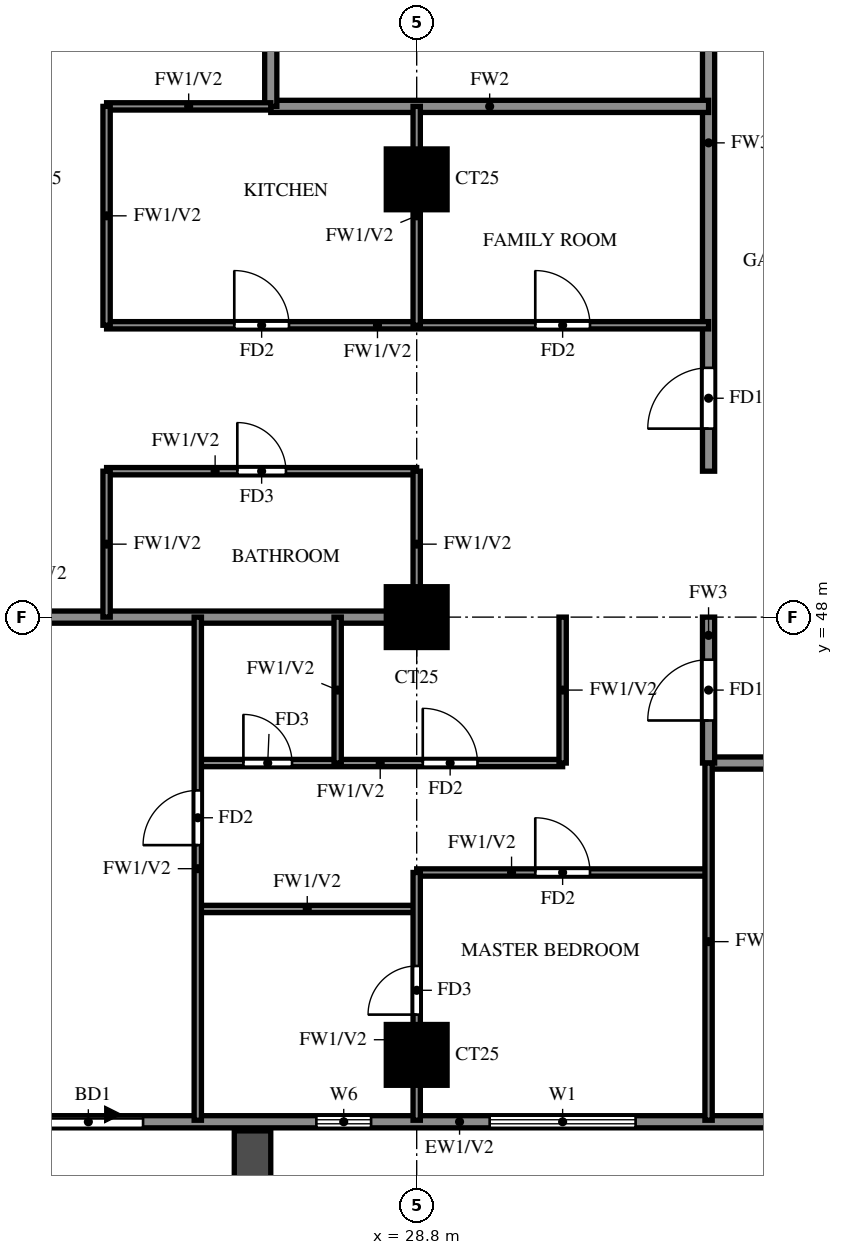
"""IFC4 building model, lengths in metres.
Left out: names, types, materials, properties, quantities, classifications, styles, units other than length and angle.
Written with IfcOpenShell. Run it as: python <this file> out.ifc"""

import sys

from ifc_helpers import new_model, si_unit, direction, frame, frame_2d, origin, origin_2d, place, context, subcontext, project, spatial, rectangle, extrude, source, transform, mapped, element, fill, save


model = new_model("IFC4")
c1 = context("Model", 3, precision=1e-05, world=origin(), true_north=direction((0.0, 1.0)))
c2 = subcontext(c1, "Body", "Model", "MODEL_VIEW")
j1 = project(units=[si_unit("LENGTHUNIT", "METRE"), si_unit("PLANEANGLEUNIT", "RADIAN")], contexts=[c1])
p1 = place(None, origin())
s1 = spatial("IfcSite", under=j1, at=p1, CompositionType="ELEMENT")
p2 = place(p1, origin())
s2 = spatial("IfcBuilding", under=s1, at=p2, CompositionType="ELEMENT")
p3 = place(p2, frame((0.0, 0.0, 157.0)))
s3 = spatial("IfcBuildingStorey", under=s2, at=p3, CompositionType="ELEMENT", Elevation=157.0)
m1 = source(origin(), c2, "Body", "SweptSolid", [
    extrude(rectangle(XDim=1.0, YDim=1.0, at=origin_2d()), origin(), (0.0, 0.0, 1.0), 3.2),
])
for number, where, z_axis, x_axis in (
    (1, (28.8, 40.8, 0.0), (0.0, 0.0, 1.0), (1.0, 0.0, 0.0)),
    (2, (28.8, 48.0, 0.0), (0.0, 0.0, 1.0), (1.0, 0.0, 0.0)),
    (3, (28.8, 55.2, 0.0), (0.0, 0.0, 1.0), (1.0, 0.0, 0.0)),
):
    element("IfcColumn", number, at=place(p3, frame(where, z_axis=z_axis, x_axis=x_axis)), inside=s3, PredefinedType="COLUMN", context=c2, shape_type="MappedRepresentation", body=[
        mapped(m1, transform((0.0, 0.0, 0.0))),
    ])
p4 = place(p3, frame((18.2, 39.7, 0.0), z_axis=(0.0, 0.0, 1.0), x_axis=(1.0, 0.0, 0.0)))
e4 = element("IfcWall", 4, at=p4, inside=s3, PredefinedType="SOLIDWALL", context=c2, shape_type="SweptSolid", body=[
    extrude(rectangle(XDim=23.8, YDim=0.2, at=frame_2d((11.9, 0.0))), origin(), (0.0, 0.0, 1.0), 3.2),
])
p5 = place(p4, frame((4.3, 0.0, 0.0)))
e5 = element("IfcOpeningElement", 5, at=p5, cuts=e4, PredefinedType="OPENING", context=c2, shape_type="SweptSolid", body=[
    extrude(rectangle(XDim=1.8, YDim=2.4, at=frame_2d((0.9, 1.2))), frame((0.0, 0.11, 0.0), z_axis=(0.0, -1.0, 0.0), x_axis=(1.0, 0.0, 0.0)), (0.0, 0.0, 1.0), 0.22),
])
p6 = place(p4, frame((1.9, 0.0, 0.6)))
e6 = element("IfcOpeningElement", 6, at=p6, cuts=e4, PredefinedType="OPENING", context=c2, shape_type="SweptSolid", body=[
    extrude(rectangle(XDim=1.8, YDim=2.4, at=frame_2d((0.9, 1.2))), frame((0.0, 0.11, 0.0), z_axis=(0.0, -1.0, 0.0), x_axis=(1.0, 0.0, 0.0)), (0.0, 0.0, 1.0), 0.22),
])
p7 = place(p4, frame((11.8, 0.0, 0.6)))
e7 = element("IfcOpeningElement", 7, at=p7, cuts=e4, PredefinedType="OPENING", context=c2, shape_type="SweptSolid", body=[
    extrude(rectangle(XDim=2.4, YDim=2.4, at=frame_2d((1.2, 1.2))), frame((0.0, 0.11, 0.0), z_axis=(0.0, -1.0, 0.0), x_axis=(1.0, 0.0, 0.0)), (0.0, 0.0, 1.0), 0.22),
])
p8 = place(p4, frame((8.95, 0.0, 1.5)))
e8 = element("IfcOpeningElement", 8, at=p8, cuts=e4, PredefinedType="OPENING", context=c2, shape_type="SweptSolid", body=[
    extrude(rectangle(XDim=0.9, YDim=0.9, at=frame_2d((0.45, 0.45))), frame((0.0, 0.11, 0.0), z_axis=(0.0, -1.0, 0.0), x_axis=(1.0, 0.0, 0.0)), (0.0, 0.0, 1.0), 0.22),
])
p9 = place(p3, frame((26.1, 39.55, 0.0), z_axis=(0.0, 0.0, 1.0), x_axis=(0.0, -1.0, 0.0)))
e9 = element("IfcWall", 9, at=p9, inside=s3, PredefinedType="SOLIDWALL", context=c2, shape_type="SweptSolid", body=[
    extrude(rectangle(XDim=2.65, YDim=0.6, at=frame_2d((1.325, 0.0))), origin(), (0.0, 0.0, 1.0), 2.85),
])
p10 = place(p3, frame((33.6, 45.6, 0.0), z_axis=(0.0, 0.0, 1.0), x_axis=(1.0, 0.0, 0.0)))
e10 = element("IfcWall", 10, at=p10, inside=s3, PredefinedType="SOLIDWALL", context=c2, shape_type="SweptSolid", body=[
    extrude(rectangle(XDim=7.2, YDim=0.2, at=frame_2d((3.6, 0.0))), origin(), (0.0, 0.0, 1.0), 3.2),
])
p11 = place(p10, frame((3.15, 0.0, 0.0)))
e11 = element("IfcOpeningElement", 11, at=p11, cuts=e10, PredefinedType="OPENING", context=c2, shape_type="SweptSolid", body=[
    extrude(rectangle(XDim=0.9, YDim=2.1, at=frame_2d((0.45, 1.05))), frame((0.0, 0.11, 0.0), z_axis=(0.0, -1.0, 0.0), x_axis=(1.0, 0.0, 0.0)), (0.0, 0.0, 1.0), 0.22),
])
p12 = place(p3, frame((33.6, 45.6, 0.0), z_axis=(0.0, 0.0, 1.0), x_axis=(0.0, 1.0, 0.0)))
e12 = element("IfcWall", 12, at=p12, inside=s3, PredefinedType="SOLIDWALL", context=c2, shape_type="SweptSolid", body=[
    extrude(rectangle(XDim=2.4, YDim=0.2, at=frame_2d((1.2, 0.0))), origin(), (0.0, 0.0, 1.0), 3.2),
])
p13 = place(p12, frame((0.7, 0.0, 0.0)))
e13 = element("IfcOpeningElement", 13, at=p13, cuts=e12, PredefinedType="OPENING", context=c2, shape_type="SweptSolid", body=[
    extrude(rectangle(XDim=1.0, YDim=2.1, at=frame_2d((0.5, 1.05))), frame((0.0, 0.11, 0.0), z_axis=(0.0, -1.0, 0.0), x_axis=(1.0, 0.0, 0.0)), (0.0, 0.0, 1.0), 0.22),
])
p14 = place(p3, frame((33.6, 50.4, 0.0), z_axis=(0.0, 0.0, 1.0), x_axis=(0.0, 1.0, 0.0)))
e14 = element("IfcWall", 14, at=p14, inside=s3, PredefinedType="SOLIDWALL", context=c2, shape_type="SweptSolid", body=[
    extrude(rectangle(XDim=12.0, YDim=0.2, at=frame_2d((6.0, 0.0))), origin(), (0.0, 0.0, 1.0), 3.2),
])
p15 = place(p14, frame((0.7, 0.0, 0.0)))
e15 = element("IfcOpeningElement", 15, at=p15, cuts=e14, PredefinedType="OPENING", context=c2, shape_type="SweptSolid", body=[
    extrude(rectangle(XDim=1.0, YDim=2.1, at=frame_2d((0.5, 1.05))), frame((0.0, 0.11, 0.0), z_axis=(0.0, -1.0, 0.0), x_axis=(1.0, 0.0, 0.0)), (0.0, 0.0, 1.0), 0.22),
])
p16 = place(p14, frame((9.7, 0.0, 0.0)))
e16 = element("IfcOpeningElement", 16, at=p16, cuts=e14, PredefinedType="OPENING", context=c2, shape_type="SweptSolid", body=[
    extrude(rectangle(XDim=1.0, YDim=2.1, at=frame_2d((0.5, 1.05))), frame((0.0, 0.11, 0.0), z_axis=(0.0, -1.0, 0.0), x_axis=(1.0, 0.0, 0.0)), (0.0, 0.0, 1.0), 0.22),
])
p17 = place(p3, frame((14.525, 48.0, 0.0), z_axis=(0.0, 0.0, 1.0), x_axis=(1.0, 0.0, 0.0)))
e17 = element("IfcWall", 17, at=p17, inside=s3, PredefinedType="SOLIDWALL", context=c2, shape_type="SweptSolid", body=[
    extrude(rectangle(XDim=14.275, YDim=0.2, at=frame_2d((7.138, 0.0))), origin(), (0.0, 0.0, 1.0), 3.2),
])
p18 = place(p3, frame((26.4, 56.4, 0.0), z_axis=(0.0, 0.0, 1.0), x_axis=(1.0, 0.0, 0.0)))
e18 = element("IfcWall", 18, at=p18, inside=s3, PredefinedType="SOLIDWALL", context=c2, shape_type="SweptSolid", body=[
    extrude(rectangle(XDim=7.2, YDim=0.2, at=frame_2d((3.6, 0.0))), origin(), (0.0, 0.0, 1.0), 3.2),
])
p19 = place(p3, frame((26.4, 56.4, 0.0), z_axis=(0.0, 0.0, 1.0), x_axis=(0.0, 1.0, 0.0)))
e19 = element("IfcWall", 19, at=p19, inside=s3, PredefinedType="SOLIDWALL", context=c2, shape_type="SweptSolid", body=[
    extrude(rectangle(XDim=2.4, YDim=0.2, at=frame_2d((1.2, 0.0))), origin(), (0.0, 0.0, 1.0), 3.2),
])
p20 = place(p3, frame((25.2, 43.2, 0.0), z_axis=(0.0, 0.0, 1.0), x_axis=(1.0, 0.0, 0.0)))
e20 = element("IfcWall", 20, at=p20, inside=s3, PredefinedType="PARTITIONING", context=c2, shape_type="SweptSolid", body=[
    extrude(rectangle(XDim=3.6, YDim=0.12, at=frame_2d((1.8, 0.0))), origin(), (0.0, 0.0, 1.0), 3.2),
])
p21 = place(p3, frame((28.8, 43.8, 0.0), z_axis=(0.0, 0.0, 1.0), x_axis=(1.0, 0.0, 0.0)))
e21 = element("IfcWall", 21, at=p21, inside=s3, PredefinedType="PARTITIONING", context=c2, shape_type="SweptSolid", body=[
    extrude(rectangle(XDim=4.8, YDim=0.12, at=frame_2d((2.4, 0.0))), origin(), (0.0, 0.0, 1.0), 3.2),
])
p22 = place(p21, frame((1.95, 0.0, 0.0)))
e22 = element("IfcOpeningElement", 22, at=p22, cuts=e21, PredefinedType="OPENING", context=c2, shape_type="SweptSolid", body=[
    extrude(rectangle(XDim=0.9, YDim=2.1, at=frame_2d((0.45, 1.05))), frame((0.0, 0.07, 0.0), z_axis=(0.0, -1.0, 0.0), x_axis=(1.0, 0.0, 0.0)), (0.0, 0.0, 1.0), 0.14),
])
p23 = place(p3, frame((25.2, 45.6, 0.0), z_axis=(0.0, 0.0, 1.0), x_axis=(1.0, 0.0, 0.0)))
e23 = element("IfcWall", 23, at=p23, inside=s3, PredefinedType="PARTITIONING", context=c2, shape_type="SweptSolid", body=[
    extrude(rectangle(XDim=6.0, YDim=0.12, at=frame_2d((3.0, 0.0))), origin(), (0.0, 0.0, 1.0), 3.2),
])
p24 = place(p23, frame((0.75, 0.0, 0.0)))
e24 = element("IfcOpeningElement", 24, at=p24, cuts=e23, PredefinedType="OPENING", context=c2, shape_type="SweptSolid", body=[
    extrude(rectangle(XDim=0.8, YDim=2.1, at=frame_2d((0.4, 1.05))), frame((0.0, 0.07, 0.0), z_axis=(0.0, -1.0, 0.0), x_axis=(1.0, 0.0, 0.0)), (0.0, 0.0, 1.0), 0.14),
])
p25 = place(p23, frame((3.7, 0.0, 0.0)))
e25 = element("IfcOpeningElement", 25, at=p25, cuts=e23, PredefinedType="OPENING", context=c2, shape_type="SweptSolid", body=[
    extrude(rectangle(XDim=0.9, YDim=2.1, at=frame_2d((0.45, 1.05))), frame((0.0, 0.07, 0.0), z_axis=(0.0, -1.0, 0.0), x_axis=(1.0, 0.0, 0.0)), (0.0, 0.0, 1.0), 0.14),
])
p26 = place(p3, frame((23.7, 50.4, 0.0), z_axis=(0.0, 0.0, 1.0), x_axis=(1.0, 0.0, 0.0)))
e26 = element("IfcWall", 26, at=p26, inside=s3, PredefinedType="PARTITIONING", context=c2, shape_type="SweptSolid", body=[
    extrude(rectangle(XDim=5.1, YDim=0.12, at=frame_2d((2.55, 0.0))), origin(), (0.0, 0.0, 1.0), 3.2),
])
p27 = place(p26, frame((2.15, 0.0, 0.0)))
e27 = element("IfcOpeningElement", 27, at=p27, cuts=e26, PredefinedType="OPENING", context=c2, shape_type="SweptSolid", body=[
    extrude(rectangle(XDim=0.8, YDim=2.1, at=frame_2d((0.4, 1.05))), frame((0.0, 0.07, 0.0), z_axis=(0.0, -1.0, 0.0), x_axis=(1.0, 0.0, 0.0)), (0.0, 0.0, 1.0), 0.14),
])
p28 = place(p3, frame((23.7, 52.8, 0.0), z_axis=(0.0, 0.0, 1.0), x_axis=(1.0, 0.0, 0.0)))
e28 = element("IfcWall", 28, at=p28, inside=s3, PredefinedType="PARTITIONING", context=c2, shape_type="SweptSolid", body=[
    extrude(rectangle(XDim=9.9, YDim=0.12, at=frame_2d((4.95, 0.0))), origin(), (0.0, 0.0, 1.0), 3.2),
])
p29 = place(p28, frame((2.1, 0.0, 0.0)))
e29 = element("IfcOpeningElement", 29, at=p29, cuts=e28, PredefinedType="OPENING", context=c2, shape_type="SweptSolid", body=[
    extrude(rectangle(XDim=0.9, YDim=2.1, at=frame_2d((0.45, 1.05))), frame((0.0, 0.07, 0.0), z_axis=(0.0, -1.0, 0.0), x_axis=(1.0, 0.0, 0.0)), (0.0, 0.0, 1.0), 0.14),
])
p30 = place(p28, frame((7.05, 0.0, 0.0)))
e30 = element("IfcOpeningElement", 30, at=p30, cuts=e28, PredefinedType="OPENING", context=c2, shape_type="SweptSolid", body=[
    extrude(rectangle(XDim=0.9, YDim=2.1, at=frame_2d((0.45, 1.05))), frame((0.0, 0.07, 0.0), z_axis=(0.0, -1.0, 0.0), x_axis=(1.0, 0.0, 0.0)), (0.0, 0.0, 1.0), 0.14),
])
p31 = place(p3, frame((23.7, 56.4, 0.0), z_axis=(0.0, 0.0, 1.0), x_axis=(1.0, 0.0, 0.0)))
e31 = element("IfcWall", 31, at=p31, inside=s3, PredefinedType="PARTITIONING", context=c2, shape_type="SweptSolid", body=[
    extrude(rectangle(XDim=2.7, YDim=0.12, at=frame_2d((1.35, 0.0))), origin(), (0.0, 0.0, 1.0), 3.2),
])
p32 = place(p3, frame((23.7, 48.0, 0.0), z_axis=(0.0, 0.0, 1.0), x_axis=(0.0, 1.0, 0.0)))
e32 = element("IfcWall", 32, at=p32, inside=s3, PredefinedType="PARTITIONING", context=c2, shape_type="SweptSolid", body=[
    extrude(rectangle(XDim=2.4, YDim=0.12, at=frame_2d((1.2, 0.0))), origin(), (0.0, 0.0, 1.0), 3.2),
])
p33 = place(p3, frame((23.7, 52.8, 0.0), z_axis=(0.0, 0.0, 1.0), x_axis=(0.0, 1.0, 0.0)))
e33 = element("IfcWall", 33, at=p33, inside=s3, PredefinedType="PARTITIONING", context=c2, shape_type="SweptSolid", body=[
    extrude(rectangle(XDim=3.6, YDim=0.12, at=frame_2d((1.8, 0.0))), origin(), (0.0, 0.0, 1.0), 3.2),
])
p34 = place(p3, frame((25.2, 39.725, 0.0), z_axis=(0.0, 0.0, 1.0), x_axis=(0.0, 1.0, 0.0)))
e34 = element("IfcWall", 34, at=p34, inside=s3, PredefinedType="PARTITIONING", context=c2, shape_type="SweptSolid", body=[
    extrude(rectangle(XDim=8.275, YDim=0.12, at=frame_2d((4.137, 0.0))), origin(), (0.0, 0.0, 1.0), 3.2),
])
p35 = place(p34, frame((4.525, 0.0, 0.0)))
e35 = element("IfcOpeningElement", 35, at=p35, cuts=e34, PredefinedType="OPENING", context=c2, shape_type="SweptSolid", body=[
    extrude(rectangle(XDim=0.9, YDim=2.1, at=frame_2d((0.45, 1.05))), frame((0.0, 0.07, 0.0), z_axis=(0.0, -1.0, 0.0), x_axis=(1.0, 0.0, 0.0)), (0.0, 0.0, 1.0), 0.14),
])
p36 = place(p3, frame((27.5, 45.6, 0.0), z_axis=(0.0, 0.0, 1.0), x_axis=(0.0, 1.0, 0.0)))
e36 = element("IfcWall", 36, at=p36, inside=s3, PredefinedType="PARTITIONING", context=c2, shape_type="SweptSolid", body=[
    extrude(rectangle(XDim=2.4, YDim=0.12, at=frame_2d((1.2, 0.0))), origin(), (0.0, 0.0, 1.0), 3.2),
])
p37 = place(p3, frame((28.8, 39.725, 0.0), z_axis=(0.0, 0.0, 1.0), x_axis=(0.0, 1.0, 0.0)))
e37 = element("IfcWall", 37, at=p37, inside=s3, PredefinedType="PARTITIONING", context=c2, shape_type="SweptSolid", body=[
    extrude(rectangle(XDim=4.075, YDim=0.12, at=frame_2d((2.038, 0.0))), origin(), (0.0, 0.0, 1.0), 3.2),
])
p38 = place(p37, frame((1.738, 0.0, 0.0)))
e38 = element("IfcOpeningElement", 38, at=p38, cuts=e37, PredefinedType="OPENING", context=c2, shape_type="SweptSolid", body=[
    extrude(rectangle(XDim=0.8, YDim=2.1, at=frame_2d((0.4, 1.05))), frame((0.0, 0.07, 0.0), z_axis=(0.0, -1.0, 0.0), x_axis=(1.0, 0.0, 0.0)), (0.0, 0.0, 1.0), 0.14),
])
p39 = place(p3, frame((28.8, 48.0, 0.0), z_axis=(0.0, 0.0, 1.0), x_axis=(0.0, 1.0, 0.0)))
e39 = element("IfcWall", 39, at=p39, inside=s3, PredefinedType="PARTITIONING", context=c2, shape_type="SweptSolid", body=[
    extrude(rectangle(XDim=2.4, YDim=0.12, at=frame_2d((1.2, 0.0))), origin(), (0.0, 0.0, 1.0), 3.2),
])
p40 = place(p3, frame((28.8, 52.8, 0.0), z_axis=(0.0, 0.0, 1.0), x_axis=(0.0, 1.0, 0.0)))
e40 = element("IfcWall", 40, at=p40, inside=s3, PredefinedType="PARTITIONING", context=c2, shape_type="SweptSolid", body=[
    extrude(rectangle(XDim=3.6, YDim=0.12, at=frame_2d((1.8, 0.0))), origin(), (0.0, 0.0, 1.0), 3.2),
])
p41 = place(p3, frame((31.2, 45.6, 0.0), z_axis=(0.0, 0.0, 1.0), x_axis=(0.0, 1.0, 0.0)))
e41 = element("IfcWall", 41, at=p41, inside=s3, PredefinedType="PARTITIONING", context=c2, shape_type="SweptSolid", body=[
    extrude(rectangle(XDim=2.4, YDim=0.12, at=frame_2d((1.2, 0.0))), origin(), (0.0, 0.0, 1.0), 3.2),
])
p42 = place(p3, frame((33.6, 39.725, 0.0), z_axis=(0.0, 0.0, 1.0), x_axis=(0.0, 1.0, 0.0)))
e42 = element("IfcWall", 42, at=p42, inside=s3, PredefinedType="PARTITIONING", context=c2, shape_type="SweptSolid", body=[
    extrude(rectangle(XDim=5.875, YDim=0.12, at=frame_2d((2.938, 0.0))), origin(), (0.0, 0.0, 1.0), 3.2),
])
p43 = place(p5, origin())
e43 = element("IfcDoor", 43, at=p43, inside=s3, OperationType="DOUBLE_DOOR_SLIDING", PredefinedType="DOOR", context=c2, shape_type="SweptSolid", body=[
    extrude(rectangle(XDim=1.8, YDim=2.4, at=frame_2d((0.9, 1.2))), frame((0.0, 0.025, 0.0), z_axis=(0.0, -1.0, 0.0), x_axis=(1.0, 0.0, 0.0)), (0.0, 0.0, 1.0), 0.05),
])
fill(e5, e43)
p44 = place(p7, origin())
e44 = element("IfcWindow", 44, at=p44, inside=s3, PartitioningType="DOUBLE_PANEL_VERTICAL", PredefinedType="WINDOW", context=c2, shape_type="SweptSolid", body=[
    extrude(rectangle(XDim=2.4, YDim=2.4, at=frame_2d((1.2, 1.2))), frame((0.0, 0.03, 0.0), z_axis=(0.0, -1.0, 0.0), x_axis=(1.0, 0.0, 0.0)), (0.0, 0.0, 1.0), 0.06),
])
fill(e7, e44)
p45 = place(p8, origin())
e45 = element("IfcWindow", 45, at=p45, inside=s3, PartitioningType="SINGLE_PANEL", PredefinedType="WINDOW", context=c2, shape_type="SweptSolid", body=[
    extrude(rectangle(XDim=0.9, YDim=0.9, at=frame_2d((0.45, 0.45))), frame((0.0, 0.03, 0.0), z_axis=(0.0, -1.0, 0.0), x_axis=(1.0, 0.0, 0.0)), (0.0, 0.0, 1.0), 0.06),
])
fill(e8, e45)
p46 = place(p13, origin())
e46 = element("IfcDoor", 46, at=p46, inside=s3, OperationType="SINGLE_SWING_LEFT", PredefinedType="DOOR", context=c2, shape_type="SweptSolid", body=[
    extrude(rectangle(XDim=1.0, YDim=2.1, at=frame_2d((0.5, 1.05))), frame((0.0, 0.025, 0.0), z_axis=(0.0, -1.0, 0.0), x_axis=(1.0, 0.0, 0.0)), (0.0, 0.0, 1.0), 0.05),
])
fill(e13, e46)
p47 = place(p35, origin())
e47 = element("IfcDoor", 47, at=p47, inside=s3, OperationType="SINGLE_SWING_RIGHT", PredefinedType="DOOR", context=c2, shape_type="SweptSolid", body=[
    extrude(rectangle(XDim=0.9, YDim=2.1, at=frame_2d((0.45, 1.05))), frame((0.0, 0.025, 0.0), z_axis=(0.0, -1.0, 0.0), x_axis=(1.0, 0.0, 0.0)), (0.0, 0.0, 1.0), 0.05),
])
fill(e35, e47)
p48 = place(p22, origin())
e48 = element("IfcDoor", 48, at=p48, inside=s3, OperationType="SINGLE_SWING_LEFT", PredefinedType="DOOR", context=c2, shape_type="SweptSolid", body=[
    extrude(rectangle(XDim=0.9, YDim=2.1, at=frame_2d((0.45, 1.05))), frame((0.0, 0.025, 0.0), z_axis=(0.0, -1.0, 0.0), x_axis=(1.0, 0.0, 0.0)), (0.0, 0.0, 1.0), 0.05),
])
fill(e22, e48)
p49 = place(p38, origin())
e49 = element("IfcDoor", 49, at=p49, inside=s3, OperationType="SINGLE_SWING_RIGHT", PredefinedType="DOOR", context=c2, shape_type="SweptSolid", body=[
    extrude(rectangle(XDim=0.8, YDim=2.1, at=frame_2d((0.4, 1.05))), frame((0.0, 0.025, 0.0), z_axis=(0.0, -1.0, 0.0), x_axis=(1.0, 0.0, 0.0)), (0.0, 0.0, 1.0), 0.05),
])
fill(e38, e49)
p50 = place(p24, origin())
e50 = element("IfcDoor", 50, at=p50, inside=s3, OperationType="SINGLE_SWING_RIGHT", PredefinedType="DOOR", context=c2, shape_type="SweptSolid", body=[
    extrude(rectangle(XDim=0.8, YDim=2.1, at=frame_2d((0.4, 1.05))), frame((0.0, 0.025, 0.0), z_axis=(0.0, -1.0, 0.0), x_axis=(1.0, 0.0, 0.0)), (0.0, 0.0, 1.0), 0.05),
])
fill(e24, e50)
p51 = place(p25, origin())
e51 = element("IfcDoor", 51, at=p51, inside=s3, OperationType="SINGLE_SWING_LEFT", PredefinedType="DOOR", context=c2, shape_type="SweptSolid", body=[
    extrude(rectangle(XDim=0.9, YDim=2.1, at=frame_2d((0.45, 1.05))), frame((0.0, 0.025, 0.0), z_axis=(0.0, -1.0, 0.0), x_axis=(1.0, 0.0, 0.0)), (0.0, 0.0, 1.0), 0.05),
])
fill(e25, e51)
p52 = place(p15, origin())
e52 = element("IfcDoor", 52, at=p52, inside=s3, OperationType="SINGLE_SWING_RIGHT", PredefinedType="DOOR", context=c2, shape_type="SweptSolid", body=[
    extrude(rectangle(XDim=1.0, YDim=2.1, at=frame_2d((0.5, 1.05))), frame((0.0, 0.025, 0.0), z_axis=(0.0, -1.0, 0.0), x_axis=(1.0, 0.0, 0.0)), (0.0, 0.0, 1.0), 0.05),
])
fill(e15, e52)
p53 = place(p27, origin())
e53 = element("IfcDoor", 53, at=p53, inside=s3, OperationType="SINGLE_SWING_RIGHT", PredefinedType="DOOR", context=c2, shape_type="SweptSolid", body=[
    extrude(rectangle(XDim=0.8, YDim=2.1, at=frame_2d((0.4, 1.05))), frame((0.0, 0.025, 0.0), z_axis=(0.0, -1.0, 0.0), x_axis=(1.0, 0.0, 0.0)), (0.0, 0.0, 1.0), 0.05),
])
fill(e27, e53)
p54 = place(p29, origin())
e54 = element("IfcDoor", 54, at=p54, inside=s3, OperationType="SINGLE_SWING_LEFT", PredefinedType="DOOR", context=c2, shape_type="SweptSolid", body=[
    extrude(rectangle(XDim=0.9, YDim=2.1, at=frame_2d((0.45, 1.05))), frame((0.0, 0.025, 0.0), z_axis=(0.0, -1.0, 0.0), x_axis=(1.0, 0.0, 0.0)), (0.0, 0.0, 1.0), 0.05),
])
fill(e29, e54)
p55 = place(p30, origin())
e55 = element("IfcDoor", 55, at=p55, inside=s3, OperationType="SINGLE_SWING_LEFT", PredefinedType="DOOR", context=c2, shape_type="SweptSolid", body=[
    extrude(rectangle(XDim=0.9, YDim=2.1, at=frame_2d((0.45, 1.05))), frame((0.0, 0.025, 0.0), z_axis=(0.0, -1.0, 0.0), x_axis=(1.0, 0.0, 0.0)), (0.0, 0.0, 1.0), 0.05),
])
fill(e30, e55)
save(model, sys.argv[1])
